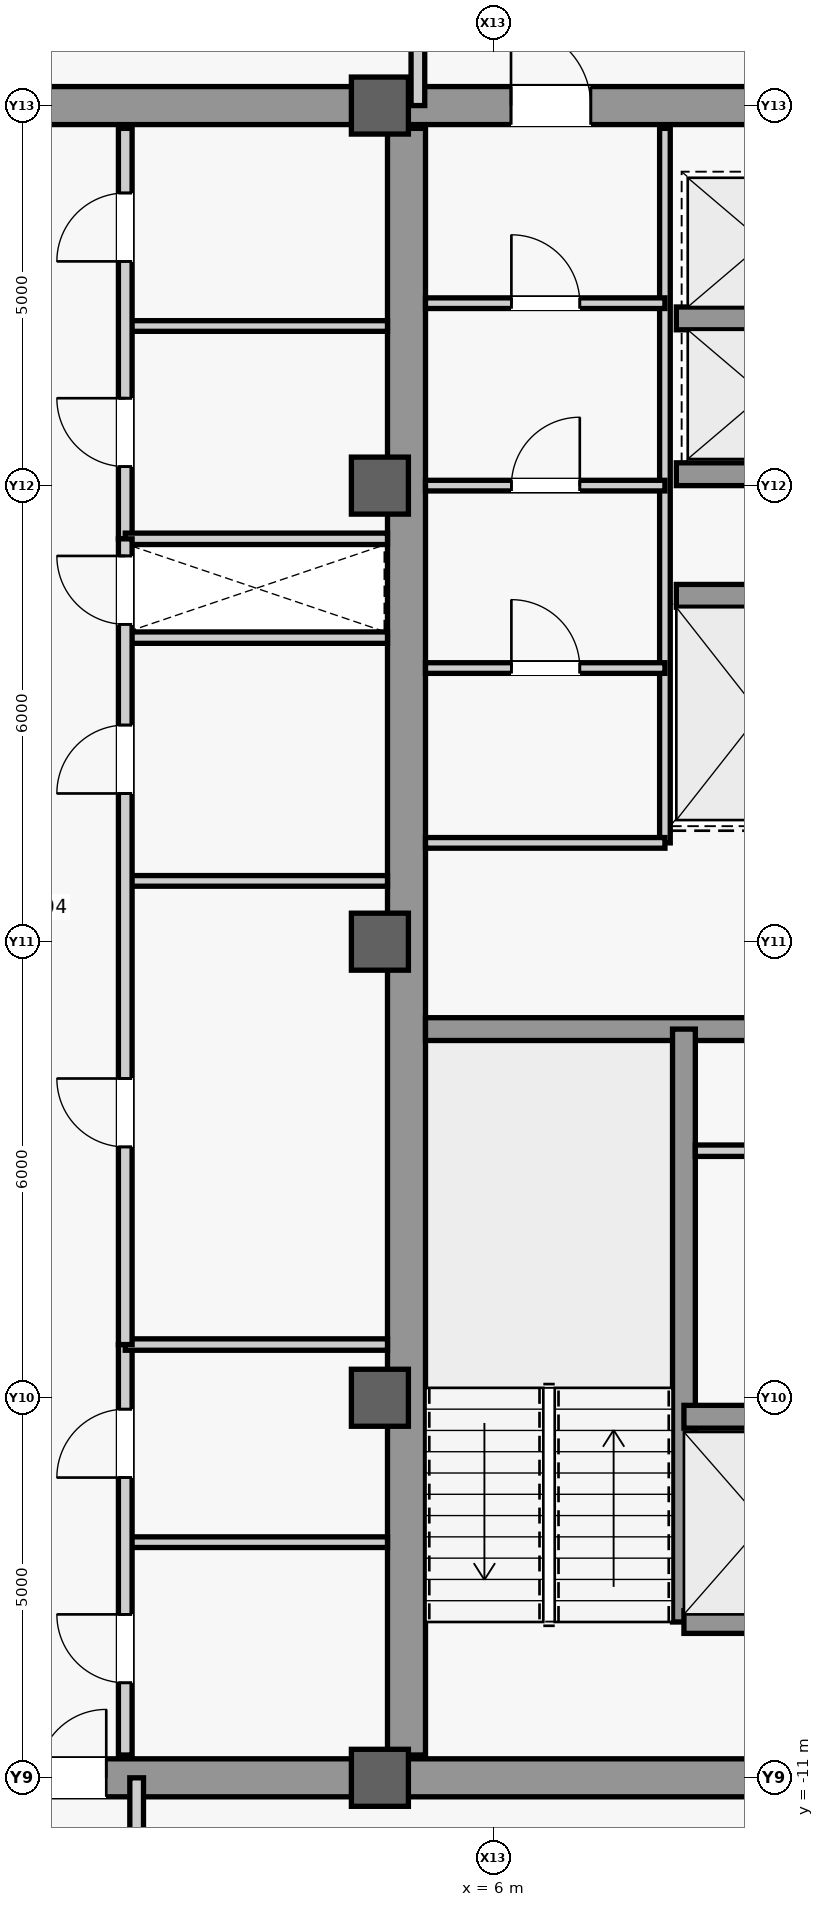
"""IFC4 building model, lengths in metres.
Left out: names, types, materials, properties, quantities, classifications, styles, units other than length and angle.
Written with IfcOpenShell. Run it as: python <this file> out.ifc"""

import sys

from ifc_helpers import new_model, si_unit, direction, frame, frame_2d, origin, origin_2d, place, context, subcontext, project, spatial, rectangle, extrude, source, transform, mapped, element, fill, save


model = new_model("IFC4")
c1 = context("Model", 3, precision=1e-05, world=origin(), true_north=direction((0.0, 1.0)))
c2 = subcontext(c1, "Body", "Model", "MODEL_VIEW")
j1 = project(units=[si_unit("LENGTHUNIT", "METRE"), si_unit("PLANEANGLEUNIT", "RADIAN")], contexts=[c1])
p1 = place(None, origin())
s1 = spatial("IfcSite", under=j1, at=p1, CompositionType="ELEMENT")
p2 = place(p1, origin())
s2 = spatial("IfcBuilding", under=s1, at=p2, CompositionType="ELEMENT")
p3 = place(p2, frame((0.0, 0.0, 358.3)))
s3 = spatial("IfcBuildingStorey", under=s2, at=p3, CompositionType="ELEMENT", Elevation=358.3)
m1 = source(origin(), c2, "Body", "SweptSolid", [
    extrude(rectangle(XDim=21.4, YDim=0.5, at=frame_2d((10.7, 0.0))), origin(), (0.0, 0.0, 1.0), 3.74),
])
p4 = place(p3, frame((4.85, -10.7, 0.0), z_axis=(0.0, 0.0, 1.0), x_axis=(0.0, 1.0, 0.0)))
e1 = element("IfcWall", 1, at=p4, inside=s3, PredefinedType="SHEAR", context=c2, shape_type="MappedRepresentation", body=[
    mapped(m1, transform((0.0, 0.0, 0.0), scale=1.0)),
])
m2 = source(origin(), c2, "Body", "SweptSolid", [
    extrude(rectangle(XDim=5.9, YDim=0.5, at=frame_2d((2.95, 0.0))), origin(), (0.0, 0.0, 1.0), 3.74),
])
p5 = place(p3, frame((4.85, -11.0, 0.0), z_axis=(0.0, 0.0, 1.0), x_axis=(1.0, 0.0, 0.0)))
e2 = element("IfcWall", 2, at=p5, inside=s3, PredefinedType="SHEAR", context=c2, shape_type="MappedRepresentation", body=[
    mapped(m2, transform((0.0, 0.0, 0.0), scale=1.0)),
])
p6 = place(p3, frame((4.85, 11.0, 0.0), z_axis=(0.0, 0.0, 1.0), x_axis=(1.0, 0.0, 0.0)))
e3 = element("IfcWall", 3, at=p6, inside=s3, PredefinedType="SHEAR", context=c2, shape_type="MappedRepresentation", body=[
    mapped(m2, transform((0.0, 0.0, 0.0), scale=1.0)),
])
m3 = source(origin(), c2, "Body", "SweptSolid", [
    extrude(rectangle(XDim=1.05, YDim=2.2, at=frame_2d((0.525, 1.1))), frame((0.0, 0.26, 0.0), z_axis=(0.0, -1.0, 0.0), x_axis=(1.0, 0.0, 0.0)), (0.0, 0.0, 1.0), 0.52),
])
p7 = place(p6, frame((1.375, 0.0, 0.0)))
e4 = element("IfcOpeningElement", 4, at=p7, cuts=e3, PredefinedType="OPENING", context=c2, shape_type="MappedRepresentation", body=[
    mapped(m3, transform((0.0, 0.0, 0.0), scale=1.0)),
])
m4 = source(origin(), c2, "Body", "SweptSolid", [
    extrude(rectangle(XDim=5.65, YDim=0.3, at=frame_2d((2.825, 0.0))), origin(), (0.0, 0.0, 1.0), 3.74),
])
p8 = place(p3, frame((5.1, -1.15, 0.0), z_axis=(0.0, 0.0, 1.0), x_axis=(1.0, 0.0, 0.0)))
e5 = element("IfcWall", 5, at=p8, inside=s3, PredefinedType="SHEAR", context=c2, shape_type="MappedRepresentation", body=[
    mapped(m4, transform((0.0, 0.0, 0.0), scale=1.0)),
])
m5 = source(origin(), c2, "Body", "SweptSolid", [
    extrude(rectangle(XDim=9.2, YDim=0.5, at=frame_2d((4.6, 0.0))), origin(), (0.0, 0.0, 1.0), 3.74),
])
p9 = place(p3, frame((-4.6, -11.0, 0.0), z_axis=(0.0, 0.0, 1.0), x_axis=(1.0, 0.0, 0.0)))
e6 = element("IfcWall", 6, at=p9, inside=s3, PredefinedType="SHEAR", context=c2, shape_type="MappedRepresentation", body=[
    mapped(m5, transform((0.0, 0.0, 0.0), scale=1.0)),
])
m6 = source(origin(), c2, "Body", "SweptSolid", [
    extrude(rectangle(XDim=1.8, YDim=2.25, at=frame_2d((0.9, 1.125))), frame((0.0, 0.26, 0.0), z_axis=(0.0, -1.0, 0.0), x_axis=(1.0, 0.0, 0.0)), (0.0, 0.0, 1.0), 0.52),
])
p10 = place(p9, frame((3.7, 0.0, 0.0)))
e7 = element("IfcOpeningElement", 7, at=p10, cuts=e6, PredefinedType="OPENING", context=c2, shape_type="MappedRepresentation", body=[
    mapped(m6, transform((0.0, 0.0, 0.0), scale=1.0)),
])
p11 = place(p3, frame((-4.6, 11.0, 0.0), z_axis=(0.0, 0.0, 1.0), x_axis=(1.0, 0.0, 0.0)))
e8 = element("IfcWall", 8, at=p11, inside=s3, PredefinedType="SHEAR", context=c2, shape_type="MappedRepresentation", body=[
    mapped(m5, transform((0.0, 0.0, 0.0), scale=1.0)),
])
m7 = source(origin(), c2, "Body", "SweptSolid", [
    extrude(rectangle(XDim=0.75, YDim=0.75, at=origin_2d()), origin(), (0.0, 0.0, 1.0), 4.0),
])
for number, where, z_axis, x_axis in (
    (9, (4.5, -11.0, 0.0), (0.0, 0.0, 1.0), (1.0, 0.0, 0.0)),
    (10, (4.5, -6.0, 0.0), (0.0, 0.0, 1.0), (1.0, 0.0, 0.0)),
    (11, (4.5, 0.0, 0.0), (0.0, 0.0, 1.0), (1.0, 0.0, 0.0)),
    (12, (4.5, 6.0, 0.0), (0.0, 0.0, 1.0), (1.0, 0.0, 0.0)),
    (13, (4.5, 11.0, 0.0), (0.0, 0.0, 1.0), (1.0, 0.0, 0.0)),
):
    element("IfcColumn", number, at=place(p3, frame(where, z_axis=z_axis, x_axis=x_axis)), inside=s3, PredefinedType="COLUMN", context=c2, shape_type="MappedRepresentation", body=[
        mapped(m7, transform((0.0, 0.0, 0.0), scale=1.0)),
    ])
m8 = source(origin(), c2, "Body", "SweptSolid", [
    extrude(rectangle(XDim=7.8, YDim=0.3, at=frame_2d((3.9, 0.0))), origin(), (0.0, 0.0, 1.0), 3.74),
])
p12 = place(p3, frame((8.5, -8.95, 0.0), z_axis=(0.0, 0.0, 1.0), x_axis=(0.0, 1.0, 0.0)))
e14 = element("IfcWall", 14, at=p12, inside=s3, PredefinedType="SHEAR", context=c2, shape_type="MappedRepresentation", body=[
    mapped(m8, transform((0.0, 0.0, 0.0), scale=1.0)),
])
m9 = source(origin(), c2, "Body", "SweptSolid", [
    extrude(rectangle(XDim=2.2, YDim=0.3, at=frame_2d((1.1, 0.0))), origin(), (0.0, 0.0, 1.0), 3.74),
])
for number, where, z_axis, x_axis in (
    (15, (8.5, -8.95, 0.0), (0.0, 0.0, 1.0), (1.0, 0.0, 0.0)),
    (16, (8.5, -6.25, 0.0), (0.0, 0.0, 1.0), (1.0, 0.0, 0.0)),
):
    element("IfcWall", number, at=place(p3, frame(where, z_axis=z_axis, x_axis=x_axis)), inside=s3, PredefinedType="SHEAR", context=c2, shape_type="MappedRepresentation", body=[
        mapped(m9, transform((0.0, 0.0, 0.0), scale=1.0)),
    ])
m10 = source(origin(), c2, "Body", "SweptSolid", [
    extrude(rectangle(XDim=2.3, YDim=0.3, at=frame_2d((1.15, 0.0))), origin(), (0.0, 0.0, 1.0), 3.74),
])
for number, where, z_axis, x_axis in (
    (17, (8.4, 4.55, 0.0), (0.0, 0.0, 1.0), (1.0, 0.0, 0.0)),
    (18, (8.4, 6.15, 0.0), (0.0, 0.0, 1.0), (1.0, 0.0, 0.0)),
    (19, (8.4, 8.2, 0.0), (0.0, 0.0, 1.0), (1.0, 0.0, 0.0)),
):
    element("IfcWall", number, at=place(p3, frame(where, z_axis=z_axis, x_axis=x_axis)), inside=s3, PredefinedType="SHEAR", context=c2, shape_type="MappedRepresentation", body=[
        mapped(m10, transform((0.0, 0.0, 0.0), scale=1.0)),
    ])
m11 = source(origin(), c2, "Body", "SweptSolid", [
    extrude(rectangle(XDim=2.05, YDim=0.15, at=frame_2d((1.025, 0.0))), origin(), (0.0, 0.0, 1.0), 3.74),
])
p13 = place(p3, frame((8.65, -2.75, 0.0), z_axis=(0.0, 0.0, 1.0), x_axis=(1.0, 0.0, 0.0)))
e20 = element("IfcWall", 20, at=p13, inside=s3, PredefinedType="PARTITIONING", context=c2, shape_type="MappedRepresentation", body=[
    mapped(m11, transform((0.0, 0.0, 0.0), scale=1.0)),
])
m12 = source(origin(), c2, "Body", "SweptSolid", [
    extrude(rectangle(XDim=9.4, YDim=0.14, at=frame_2d((4.7, 0.0))), origin(), (0.0, 0.0, 1.0), 3.74),
])
p14 = place(p3, frame((8.25, 1.3, 0.0), z_axis=(0.0, 0.0, 1.0), x_axis=(0.0, 1.0, 0.0)))
e21 = element("IfcWall", 21, at=p14, inside=s3, PredefinedType="PARTITIONING", context=c2, shape_type="MappedRepresentation", body=[
    mapped(m12, transform((0.0, 0.0, 0.0), scale=1.0)),
])
m13 = source(origin(), c2, "Body", "SweptSolid", [
    extrude(rectangle(XDim=3.15, YDim=0.14, at=frame_2d((1.575, 0.0))), origin(), (0.0, 0.0, 1.0), 3.74),
])
p15 = place(p3, frame((5.1, 1.3, 0.0), z_axis=(0.0, 0.0, 1.0), x_axis=(1.0, 0.0, 0.0)))
e22 = element("IfcWall", 22, at=p15, inside=s3, PredefinedType="PARTITIONING", context=c2, shape_type="MappedRepresentation", body=[
    mapped(m13, transform((0.0, 0.0, 0.0), scale=1.0)),
])
p16 = place(p3, frame((5.1, 8.4, 0.0), z_axis=(0.0, 0.0, 1.0), x_axis=(1.0, 0.0, 0.0)))
e23 = element("IfcWall", 23, at=p16, inside=s3, PredefinedType="PARTITIONING", context=c2, shape_type="MappedRepresentation", body=[
    mapped(m13, transform((0.0, 0.0, 0.0), scale=1.0)),
])
m14 = source(origin(), c2, "Body", "SweptSolid", [
    extrude(rectangle(XDim=0.9, YDim=2.15, at=frame_2d((0.45, 1.075))), frame((0.0, 0.08, 0.0), z_axis=(0.0, -1.0, 0.0), x_axis=(1.0, 0.0, 0.0)), (0.0, 0.0, 1.0), 0.16),
])
p17 = place(p16, frame((1.13, 0.0, 0.0)))
e24 = element("IfcOpeningElement", 24, at=p17, cuts=e23, PredefinedType="OPENING", context=c2, shape_type="MappedRepresentation", body=[
    mapped(m14, transform((0.0, 0.0, 0.0), scale=1.0)),
])
p18 = place(p3, frame((5.1, 6.0, 0.0), z_axis=(0.0, 0.0, 1.0), x_axis=(1.0, 0.0, 0.0)))
e25 = element("IfcWall", 25, at=p18, inside=s3, PredefinedType="PARTITIONING", context=c2, shape_type="MappedRepresentation", body=[
    mapped(m13, transform((0.0, 0.0, 0.0), scale=1.0)),
])
p19 = place(p18, frame((1.13, 0.0, 0.0)))
e26 = element("IfcOpeningElement", 26, at=p19, cuts=e25, PredefinedType="OPENING", context=c2, shape_type="MappedRepresentation", body=[
    mapped(m14, transform((0.0, 0.0, 0.0), scale=1.0)),
])
p20 = place(p3, frame((5.1, 3.6, 0.0), z_axis=(0.0, 0.0, 1.0), x_axis=(1.0, 0.0, 0.0)))
e27 = element("IfcWall", 27, at=p20, inside=s3, PredefinedType="PARTITIONING", context=c2, shape_type="MappedRepresentation", body=[
    mapped(m13, transform((0.0, 0.0, 0.0), scale=1.0)),
])
p21 = place(p20, frame((1.13, 0.0, 0.0)))
e28 = element("IfcOpeningElement", 28, at=p21, cuts=e27, PredefinedType="OPENING", context=c2, shape_type="MappedRepresentation", body=[
    mapped(m14, transform((0.0, 0.0, 0.0), scale=1.0)),
])
m15 = source(origin(), c2, "Body", "SweptSolid", [
    extrude(rectangle(XDim=3.45, YDim=0.15, at=frame_2d((1.725, 0.0))), origin(), (0.0, 0.0, 1.0), 3.74),
])
p22 = place(p3, frame((1.15, 4.0, 0.0), z_axis=(0.0, 0.0, 1.0), x_axis=(1.0, 0.0, 0.0)))
e29 = element("IfcWall", 29, at=p22, inside=s3, PredefinedType="PARTITIONING", context=c2, shape_type="MappedRepresentation", body=[
    mapped(m15, transform((0.0, 0.0, 0.0), scale=1.0)),
])
m16 = source(origin(), c2, "Body", "SweptSolid", [
    extrude(rectangle(XDim=3.45, YDim=0.14, at=frame_2d((1.725, 0.0))), origin(), (0.0, 0.0, 1.0), 3.74),
])
p23 = place(p3, frame((1.15, -7.9, 0.0), z_axis=(0.0, 0.0, 1.0), x_axis=(1.0, 0.0, 0.0)))
e30 = element("IfcWall", 30, at=p23, inside=s3, PredefinedType="PARTITIONING", context=c2, shape_type="MappedRepresentation", body=[
    mapped(m16, transform((0.0, 0.0, 0.0), scale=1.0)),
])
m17 = source(origin(), c2, "Body", "SweptSolid", [
    extrude(rectangle(XDim=5.4, YDim=0.18, at=frame_2d((2.7, 0.0))), origin(), (0.0, 0.0, 1.0), 3.74),
])
p24 = place(p3, frame((1.15, -10.7, 0.0), z_axis=(0.0, 0.0, 1.0), x_axis=(0.0, 1.0, 0.0)))
e31 = element("IfcWall", 31, at=p24, inside=s3, PredefinedType="PARTITIONING", context=c2, shape_type="MappedRepresentation", body=[
    mapped(m17, transform((0.0, 0.0, 0.0), scale=1.0)),
])
m18 = source(origin(), c2, "Body", "SweptSolid", [
    extrude(rectangle(XDim=0.9, YDim=2.15, at=frame_2d((0.45, 1.075))), frame((0.0, 0.1, 0.0), z_axis=(0.0, -1.0, 0.0), x_axis=(1.0, 0.0, 0.0)), (0.0, 0.0, 1.0), 0.2),
])
p25 = place(p24, frame((0.95, 0.0, 0.0)))
e32 = element("IfcOpeningElement", 32, at=p25, cuts=e31, PredefinedType="OPENING", context=c2, shape_type="MappedRepresentation", body=[
    mapped(m18, transform((0.0, 0.0, 0.0), scale=1.0)),
])
p26 = place(p24, frame((3.65, 0.0, 0.0)))
e33 = element("IfcOpeningElement", 33, at=p26, cuts=e31, PredefinedType="OPENING", context=c2, shape_type="MappedRepresentation", body=[
    mapped(m18, transform((0.0, 0.0, 0.0), scale=1.0)),
])
p27 = place(p3, frame((1.15, -5.3, 0.0), z_axis=(0.0, 0.0, 1.0), x_axis=(1.0, 0.0, 0.0)))
e34 = element("IfcWall", 34, at=p27, inside=s3, PredefinedType="PARTITIONING", context=c2, shape_type="MappedRepresentation", body=[
    mapped(m15, transform((0.0, 0.0, 0.0), scale=1.0)),
])
p28 = place(p3, frame((1.15, 8.1, 0.0), z_axis=(0.0, 0.0, 1.0), x_axis=(1.0, 0.0, 0.0)))
e35 = element("IfcWall", 35, at=p28, inside=s3, PredefinedType="PARTITIONING", context=c2, shape_type="MappedRepresentation", body=[
    mapped(m16, transform((0.0, 0.0, 0.0), scale=1.0)),
])
p29 = place(p3, frame((1.15, 5.3, 0.0), z_axis=(0.0, 0.0, 1.0), x_axis=(0.0, 1.0, 0.0)))
e36 = element("IfcWall", 36, at=p29, inside=s3, PredefinedType="PARTITIONING", context=c2, shape_type="MappedRepresentation", body=[
    mapped(m17, transform((0.0, 0.0, 0.0), scale=1.0)),
])
p30 = place(p29, frame((0.95, 0.0, 0.0)))
e37 = element("IfcOpeningElement", 37, at=p30, cuts=e36, PredefinedType="OPENING", context=c2, shape_type="MappedRepresentation", body=[
    mapped(m18, transform((0.0, 0.0, 0.0), scale=1.0)),
])
p31 = place(p29, frame((3.65, 0.0, 0.0)))
e38 = element("IfcOpeningElement", 38, at=p31, cuts=e36, PredefinedType="OPENING", context=c2, shape_type="MappedRepresentation", body=[
    mapped(m18, transform((0.0, 0.0, 0.0), scale=1.0)),
])
p32 = place(p3, frame((1.15, 5.3, 0.0), z_axis=(0.0, 0.0, 1.0), x_axis=(1.0, 0.0, 0.0)))
e39 = element("IfcWall", 39, at=p32, inside=s3, PredefinedType="PARTITIONING", context=c2, shape_type="MappedRepresentation", body=[
    mapped(m15, transform((0.0, 0.0, 0.0), scale=1.0)),
])
p33 = place(p3, frame((1.15, 0.8, 0.0), z_axis=(0.0, 0.0, 1.0), x_axis=(1.0, 0.0, 0.0)))
e40 = element("IfcWall", 40, at=p33, inside=s3, PredefinedType="PARTITIONING", context=c2, shape_type="MappedRepresentation", body=[
    mapped(m16, transform((0.0, 0.0, 0.0), scale=1.0)),
])
m19 = source(origin(), c2, "Body", "SweptSolid", [
    extrude(rectangle(XDim=10.6, YDim=0.18, at=frame_2d((5.3, 0.0))), origin(), (0.0, 0.0, 1.0), 3.74),
])
p34 = place(p3, frame((1.15, -5.3, 0.0), z_axis=(0.0, 0.0, 1.0), x_axis=(0.0, 1.0, 0.0)))
e41 = element("IfcWall", 41, at=p34, inside=s3, PredefinedType="PARTITIONING", context=c2, shape_type="MappedRepresentation", body=[
    mapped(m19, transform((0.0, 0.0, 0.0), scale=1.0)),
])
p35 = place(p34, frame((2.6, 0.0, 0.0)))
e42 = element("IfcOpeningElement", 42, at=p35, cuts=e41, PredefinedType="OPENING", context=c2, shape_type="MappedRepresentation", body=[
    mapped(m18, transform((0.0, 0.0, 0.0), scale=1.0)),
])
p36 = place(p34, frame((7.25, 0.0, 0.0)))
e43 = element("IfcOpeningElement", 43, at=p36, cuts=e41, PredefinedType="OPENING", context=c2, shape_type="MappedRepresentation", body=[
    mapped(m18, transform((0.0, 0.0, 0.0), scale=1.0)),
])
p37 = place(p34, frame((9.475, 0.0, 0.0)))
e44 = element("IfcOpeningElement", 44, at=p37, cuts=e41, PredefinedType="OPENING", context=c2, shape_type="MappedRepresentation", body=[
    mapped(m18, transform((0.0, 0.0, 0.0), scale=1.0)),
])
m20 = source(origin(), c2, "Body", "SweptSolid", [
    extrude(rectangle(XDim=5.3, YDim=0.18, at=frame_2d((2.65, 0.0))), origin(), (0.0, 0.0, 1.0), 3.74),
])
p38 = place(p3, frame((1.3, -16.3, 0.0), z_axis=(0.0, 0.0, 1.0), x_axis=(0.0, 1.0, 0.0)))
e45 = element("IfcWall", 45, at=p38, inside=s3, PredefinedType="PARTITIONING", context=c2, shape_type="MappedRepresentation", body=[
    mapped(m20, transform((0.0, 0.0, 0.0), scale=1.0)),
])
m21 = source(origin(), c2, "Body", "SweptSolid", [
    extrude(rectangle(XDim=2.6, YDim=0.18, at=frame_2d((1.3, 0.0))), origin(), (0.0, 0.0, 1.0), 3.74),
])
p39 = place(p3, frame((5.0, 11.0, 0.0), z_axis=(0.0, 0.0, 1.0), x_axis=(0.0, 1.0, 0.0)))
e46 = element("IfcWall", 46, at=p39, inside=s3, PredefinedType="PARTITIONING", context=c2, shape_type="MappedRepresentation", body=[
    mapped(m21, transform((0.0, 0.0, 0.0), scale=1.0)),
])
p40 = place(p39, frame((0.85, 0.0, 0.0)))
e47 = element("IfcOpeningElement", 47, at=p40, cuts=e46, PredefinedType="OPENING", context=c2, shape_type="MappedRepresentation", body=[
    mapped(m18, transform((0.0, 0.0, 0.0), scale=1.0)),
])
m22 = source(origin(), c2, "Body", "SweptSolid", [
    extrude(rectangle(XDim=1.05, YDim=2.2, at=frame_2d((0.525, 1.1))), frame((0.0, 0.025, 0.0), z_axis=(0.0, -1.0, 0.0), x_axis=(1.0, 0.0, 0.0)), (0.0, 0.0, 1.0), 0.05),
])
p41 = place(p7, origin())
e48 = element("IfcDoor", 48, at=p41, inside=s3, OperationType="SINGLE_SWING_LEFT", PredefinedType="DOOR", context=c2, shape_type="MappedRepresentation", body=[
    mapped(m22, transform((0.0, 0.0, 0.0), scale=1.0)),
])
fill(e4, e48)
m23 = source(origin(), c2, "Body", "SweptSolid", [
    extrude(rectangle(XDim=0.9, YDim=2.15, at=frame_2d((0.45, 1.075))), frame((0.0, 0.025, 0.0), z_axis=(0.0, -1.0, 0.0), x_axis=(1.0, 0.0, 0.0)), (0.0, 0.0, 1.0), 0.05),
])
p42 = place(p17, origin())
e49 = element("IfcDoor", 49, at=p42, inside=s3, OperationType="SINGLE_SWING_LEFT", PredefinedType="DOOR", context=c2, shape_type="MappedRepresentation", body=[
    mapped(m23, transform((0.0, 0.0, 0.0), scale=1.0)),
])
fill(e24, e49)
p43 = place(p19, origin())
e50 = element("IfcDoor", 50, at=p43, inside=s3, OperationType="SINGLE_SWING_RIGHT", PredefinedType="DOOR", context=c2, shape_type="MappedRepresentation", body=[
    mapped(m23, transform((0.0, 0.0, 0.0), scale=1.0)),
])
fill(e26, e50)
p44 = place(p21, origin())
e51 = element("IfcDoor", 51, at=p44, inside=s3, OperationType="SINGLE_SWING_LEFT", PredefinedType="DOOR", context=c2, shape_type="MappedRepresentation", body=[
    mapped(m23, transform((0.0, 0.0, 0.0), scale=1.0)),
])
fill(e28, e51)
p45 = place(p25, origin())
e52 = element("IfcDoor", 52, at=p45, inside=s3, OperationType="SINGLE_SWING_RIGHT", PredefinedType="DOOR", context=c2, shape_type="MappedRepresentation", body=[
    mapped(m23, transform((0.0, 0.0, 0.0), scale=1.0)),
])
fill(e32, e52)
p46 = place(p26, origin())
e53 = element("IfcDoor", 53, at=p46, inside=s3, OperationType="SINGLE_SWING_LEFT", PredefinedType="DOOR", context=c2, shape_type="MappedRepresentation", body=[
    mapped(m23, transform((0.0, 0.0, 0.0), scale=1.0)),
])
fill(e33, e53)
m24 = source(origin(), c2, "Body", "SweptSolid", [
    extrude(rectangle(XDim=1.8, YDim=2.25, at=frame_2d((0.9, 1.125))), frame((0.0, 0.025, 0.0), z_axis=(0.0, -1.0, 0.0), x_axis=(1.0, 0.0, 0.0)), (0.0, 0.0, 1.0), 0.05),
])
p47 = place(p10, origin())
e54 = element("IfcDoor", 54, at=p47, inside=s3, OperationType="SINGLE_SWING_LEFT", PredefinedType="DOOR", context=c2, shape_type="MappedRepresentation", body=[
    mapped(m24, transform((0.0, 0.0, 0.0), scale=1.0)),
])
fill(e7, e54)
p48 = place(p30, origin())
e55 = element("IfcDoor", 55, at=p48, inside=s3, OperationType="SINGLE_SWING_RIGHT", PredefinedType="DOOR", context=c2, shape_type="MappedRepresentation", body=[
    mapped(m23, transform((0.0, 0.0, 0.0), scale=1.0)),
])
fill(e37, e55)
p49 = place(p31, origin())
e56 = element("IfcDoor", 56, at=p49, inside=s3, OperationType="SINGLE_SWING_LEFT", PredefinedType="DOOR", context=c2, shape_type="MappedRepresentation", body=[
    mapped(m23, transform((0.0, 0.0, 0.0), scale=1.0)),
])
fill(e38, e56)
p50 = place(p35, origin())
e57 = element("IfcDoor", 57, at=p50, inside=s3, OperationType="SINGLE_SWING_RIGHT", PredefinedType="DOOR", context=c2, shape_type="MappedRepresentation", body=[
    mapped(m23, transform((0.0, 0.0, 0.0), scale=1.0)),
])
fill(e42, e57)
p51 = place(p36, origin())
e58 = element("IfcDoor", 58, at=p51, inside=s3, OperationType="SINGLE_SWING_LEFT", PredefinedType="DOOR", context=c2, shape_type="MappedRepresentation", body=[
    mapped(m23, transform((0.0, 0.0, 0.0), scale=1.0)),
])
fill(e43, e58)
p52 = place(p37, origin())
e59 = element("IfcDoor", 59, at=p52, inside=s3, OperationType="SINGLE_SWING_RIGHT", PredefinedType="DOOR", context=c2, shape_type="MappedRepresentation", body=[
    mapped(m23, transform((0.0, 0.0, 0.0), scale=1.0)),
])
fill(e44, e59)
save(model, sys.argv[1])
